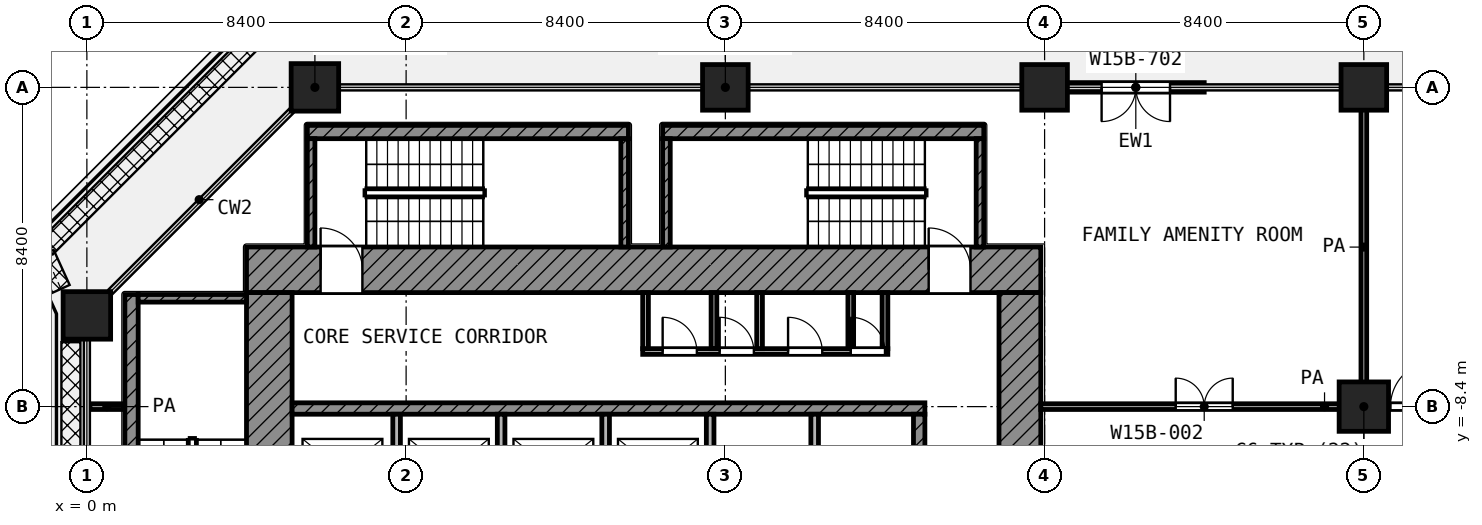
"""IFC4 building model, lengths in metres.
Left out: names, types, materials, properties, quantities, classifications, styles, units other than length and angle.
Written with IfcOpenShell. Run it as: python <this file> out.ifc"""

import sys

from ifc_helpers import new_model, si_unit, direction, frame, frame_2d, origin, origin_2d, place, context, subcontext, project, spatial, rectangle, extrude, element, fill, save


model = new_model("IFC4")
c1 = context("Model", 3, precision=1e-05, world=origin(), true_north=direction((0.0, 1.0)))
c2 = subcontext(c1, "Body", "Model", "MODEL_VIEW")
j1 = project(units=[si_unit("LENGTHUNIT", "METRE"), si_unit("PLANEANGLEUNIT", "RADIAN")], contexts=[c1])
p1 = place(None, origin())
s1 = spatial("IfcSite", under=j1, at=p1, CompositionType="ELEMENT")
p2 = place(p1, origin())
s2 = spatial("IfcBuilding", under=s1, at=p2, CompositionType="ELEMENT")
p3 = place(p2, frame((0.0, 0.0, 85.4)))
s3 = spatial("IfcBuildingStorey", under=s2, at=p3, CompositionType="ELEMENT", Elevation=85.4)
p4 = place(p3, frame((6.0, 0.0, 0.0), z_axis=(0.0, 0.0, 1.0), x_axis=(1.0, 0.0, 0.0)))
e1 = element("IfcColumn", 1, at=p4, inside=s3, PredefinedType="COLUMN", context=c2, shape_type="SweptSolid", body=[
    extrude(rectangle(XDim=1.25, YDim=1.25, at=origin_2d()), origin(), (0.0, 0.0, 1.0), 4.2),
])
for number, where, z_axis, x_axis in (
    (2, (16.8, 0.0, 0.0), (0.0, 0.0, 1.0), (1.0, 0.0, 0.0)),
    (3, (25.2, 0.0, 0.0), (0.0, 0.0, 1.0), (1.0, 0.0, 0.0)),
    (4, (33.6, 0.0, 0.0), (0.0, 0.0, 1.0), (1.0, 0.0, 0.0)),
):
    element("IfcColumn", number, at=place(p3, frame(where, z_axis=z_axis, x_axis=x_axis)), inside=s3, PredefinedType="COLUMN", context=c2, shape_type="SweptSolid", body=[
        extrude(rectangle(XDim=1.2, YDim=1.2, at=origin_2d()), origin(), (0.0, 0.0, 1.0), 4.2),
    ])
p5 = place(p3, frame((0.0, -6.0, 0.0), z_axis=(0.0, 0.0, 1.0), x_axis=(1.0, 0.0, 0.0)))
e5 = element("IfcColumn", 5, at=p5, inside=s3, PredefinedType="COLUMN", context=c2, shape_type="SweptSolid", body=[
    extrude(rectangle(XDim=1.25, YDim=1.25, at=origin_2d()), origin(), (0.0, 0.0, 1.0), 4.2),
])
p6 = place(p3, frame((33.6, -8.4, 0.0), z_axis=(0.0, 0.0, 1.0), x_axis=(1.0, 0.0, 0.0)))
e6 = element("IfcColumn", 6, at=p6, inside=s3, PredefinedType="COLUMN", context=c2, shape_type="SweptSolid", body=[
    extrude(rectangle(XDim=1.3, YDim=1.3, at=origin_2d()), origin(), (0.0, 0.0, 1.0), 4.2),
])
p7 = place(p3, frame((29.4, 0.0, 0.0), z_axis=(0.0, 0.0, 1.0), x_axis=(-1.0, 0.0, 0.0)))
e7 = element("IfcWall", 7, at=p7, inside=s3, PredefinedType="SOLIDWALL", context=c2, shape_type="SweptSolid", body=[
    extrude(rectangle(XDim=3.6, YDim=0.25, at=frame_2d((1.8, 0.0))), origin(), (0.0, 0.0, 1.0), 3.78),
])
p8 = place(p7, frame((0.9, 0.0, 0.0)))
e8 = element("IfcOpeningElement", 8, at=p8, cuts=e7, PredefinedType="OPENING", context=c2, shape_type="SweptSolid", body=[
    extrude(rectangle(XDim=1.8, YDim=2.1, at=frame_2d((0.9, 1.05))), frame((0.0, 0.135, 0.0), z_axis=(0.0, -1.0, 0.0), x_axis=(1.0, 0.0, 0.0)), (0.0, 0.0, 1.0), 0.27),
])
p9 = place(p3, frame((4.2, -4.8, 0.0), z_axis=(0.0, 0.0, 1.0), x_axis=(1.0, 0.0, 0.0)))
e9 = element("IfcWall", 9, at=p9, inside=s3, PredefinedType="SHEAR", context=c2, shape_type="SweptSolid", body=[
    extrude(rectangle(XDim=20.9, YDim=1.2, at=frame_2d((10.45, 0.0))), origin(), (0.0, 0.0, 1.0), 3.9),
])
p10 = place(p9, frame((1.95, 0.0, 0.0)))
e10 = element("IfcOpeningElement", 10, at=p10, cuts=e9, PredefinedType="OPENING", context=c2, shape_type="SweptSolid", body=[
    extrude(rectangle(XDim=1.1, YDim=2.1, at=frame_2d((0.55, 1.05))), frame((0.0, 0.61, 0.0), z_axis=(0.0, -1.0, 0.0), x_axis=(1.0, 0.0, 0.0)), (0.0, 0.0, 1.0), 1.22),
])
p11 = place(p9, frame((17.95, 0.0, 0.0)))
e11 = element("IfcOpeningElement", 11, at=p11, cuts=e9, PredefinedType="OPENING", context=c2, shape_type="SweptSolid", body=[
    extrude(rectangle(XDim=1.1, YDim=2.1, at=frame_2d((0.55, 1.05))), frame((0.0, 0.61, 0.0), z_axis=(0.0, -1.0, 0.0), x_axis=(1.0, 0.0, 0.0)), (0.0, 0.0, 1.0), 1.22),
])
p12 = place(p3, frame((4.8, -25.1, 0.0), z_axis=(0.0, 0.0, 1.0), x_axis=(0.0, 1.0, 0.0)))
e12 = element("IfcWall", 12, at=p12, inside=s3, PredefinedType="SHEAR", context=c2, shape_type="SweptSolid", body=[
    extrude(rectangle(XDim=19.7, YDim=1.2, at=frame_2d((9.85, 0.0))), origin(), (0.0, 0.0, 1.0), 3.9),
])
p13 = place(p12, frame((11.55, 0.0, 0.0)))
e13 = element("IfcOpeningElement", 13, at=p13, cuts=e12, PredefinedType="OPENING", context=c2, shape_type="SweptSolid", body=[
    extrude(rectangle(XDim=1.1, YDim=2.1, at=frame_2d((0.55, 1.05))), frame((0.0, 0.61, 0.0), z_axis=(0.0, -1.0, 0.0), x_axis=(1.0, 0.0, 0.0)), (0.0, 0.0, 1.0), 1.22),
])
p14 = place(p12, frame((2.25, 0.0, 0.0)))
e14 = element("IfcOpeningElement", 14, at=p14, cuts=e12, PredefinedType="OPENING", context=c2, shape_type="SweptSolid", body=[
    extrude(rectangle(XDim=1.1, YDim=2.1, at=frame_2d((0.55, 1.05))), frame((0.0, 0.61, 0.0), z_axis=(0.0, -1.0, 0.0), x_axis=(1.0, 0.0, 0.0)), (0.0, 0.0, 1.0), 1.22),
])
p15 = place(p3, frame((24.55, -24.0, 0.0), z_axis=(0.0, 0.0, 1.0), x_axis=(0.0, 1.0, 0.0)))
e15 = element("IfcWall", 15, at=p15, inside=s3, PredefinedType="SHEAR", context=c2, shape_type="SweptSolid", body=[
    extrude(rectangle(XDim=18.6, YDim=1.1, at=frame_2d((9.3, 0.0))), origin(), (0.0, 0.0, 1.0), 3.9),
])
p16 = place(p15, frame((10.5, 0.0, 0.0)))
e16 = element("IfcOpeningElement", 16, at=p16, cuts=e15, PredefinedType="OPENING", context=c2, shape_type="SweptSolid", body=[
    extrude(rectangle(XDim=1.8, YDim=2.1, at=frame_2d((0.9, 1.05))), frame((0.0, 0.56, 0.0), z_axis=(0.0, -1.0, 0.0), x_axis=(1.0, 0.0, 0.0)), (0.0, 0.0, 1.0), 1.12),
])
p17 = place(p3, frame((5.4, -8.45, 0.0), z_axis=(0.0, 0.0, 1.0), x_axis=(1.0, 0.0, 0.0)))
e17 = element("IfcWall", 17, at=p17, inside=s3, PredefinedType="SHEAR", context=c2, shape_type="SweptSolid", body=[
    extrude(rectangle(XDim=16.65, YDim=0.3, at=frame_2d((8.325, 0.0))), origin(), (0.0, 0.0, 1.0), 3.9),
])
p18 = place(p3, frame((21.9, -10.95, 0.0), z_axis=(0.0, 0.0, 1.0), x_axis=(0.0, 1.0, 0.0)))
e18 = element("IfcWall", 18, at=p18, inside=s3, PredefinedType="SHEAR", context=c2, shape_type="SweptSolid", body=[
    extrude(rectangle(XDim=2.35, YDim=0.3, at=frame_2d((1.175, 0.0))), origin(), (0.0, 0.0, 1.0), 3.9),
])
for number, where, z_axis, x_axis in (
    (19, (8.15, -10.95, 0.0), (0.0, 0.0, 1.0), (0.0, 1.0, 0.0)),
    (20, (10.9, -10.95, 0.0), (0.0, 0.0, 1.0), (0.0, 1.0, 0.0)),
    (21, (13.65, -10.95, 0.0), (0.0, 0.0, 1.0), (0.0, 1.0, 0.0)),
    (22, (16.4, -10.95, 0.0), (0.0, 0.0, 1.0), (0.0, 1.0, 0.0)),
    (23, (19.15, -10.95, 0.0), (0.0, 0.0, 1.0), (0.0, 1.0, 0.0)),
):
    element("IfcWall", number, at=place(p3, frame(where, z_axis=z_axis, x_axis=x_axis)), inside=s3, PredefinedType="PARTITIONING", context=c2, shape_type="SweptSolid", body=[
        extrude(rectangle(XDim=2.35, YDim=0.2, at=frame_2d((1.175, 0.0))), origin(), (0.0, 0.0, 1.0), 3.9),
    ])
p19 = place(p3, frame((14.625, -6.95, 0.0), z_axis=(0.0, 0.0, 1.0), x_axis=(1.0, 0.0, 0.0)))
e24 = element("IfcWall", 24, at=p19, inside=s3, PredefinedType="PARTITIONING", context=c2, shape_type="SweptSolid", body=[
    extrude(rectangle(XDim=6.45, YDim=0.15, at=frame_2d((3.225, 0.0))), origin(), (0.0, 0.0, 1.0), 3.9),
])
p20 = place(p19, frame((0.525, 0.0, 0.0)))
e25 = element("IfcOpeningElement", 25, at=p20, cuts=e24, PredefinedType="OPENING", context=c2, shape_type="SweptSolid", body=[
    extrude(rectangle(XDim=0.9, YDim=2.1, at=frame_2d((0.45, 1.05))), frame((0.0, 0.085, 0.0), z_axis=(0.0, -1.0, 0.0), x_axis=(1.0, 0.0, 0.0)), (0.0, 0.0, 1.0), 0.17),
])
p21 = place(p19, frame((2.025, 0.0, 0.0)))
e26 = element("IfcOpeningElement", 26, at=p21, cuts=e24, PredefinedType="OPENING", context=c2, shape_type="SweptSolid", body=[
    extrude(rectangle(XDim=0.9, YDim=2.1, at=frame_2d((0.45, 1.05))), frame((0.0, 0.085, 0.0), z_axis=(0.0, -1.0, 0.0), x_axis=(1.0, 0.0, 0.0)), (0.0, 0.0, 1.0), 0.17),
])
p22 = place(p19, frame((3.825, 0.0, 0.0)))
e27 = element("IfcOpeningElement", 27, at=p22, cuts=e24, PredefinedType="OPENING", context=c2, shape_type="SweptSolid", body=[
    extrude(rectangle(XDim=0.9, YDim=2.1, at=frame_2d((0.45, 1.05))), frame((0.0, 0.085, 0.0), z_axis=(0.0, -1.0, 0.0), x_axis=(1.0, 0.0, 0.0)), (0.0, 0.0, 1.0), 0.17),
])
p23 = place(p19, frame((5.475, 0.0, 0.0)))
e28 = element("IfcOpeningElement", 28, at=p23, cuts=e24, PredefinedType="OPENING", context=c2, shape_type="SweptSolid", body=[
    extrude(rectangle(XDim=0.9, YDim=2.1, at=frame_2d((0.45, 1.05))), frame((0.0, 0.085, 0.0), z_axis=(0.0, -1.0, 0.0), x_axis=(1.0, 0.0, 0.0)), (0.0, 0.0, 1.0), 0.17),
])
for number, where, z_axis, x_axis in (
    (29, (14.7, -6.875, 0.0), (0.0, 0.0, 1.0), (0.0, 1.0, 0.0)),
    (30, (16.5, -6.875, 0.0), (0.0, 0.0, 1.0), (0.0, 1.0, 0.0)),
    (31, (17.7, -6.875, 0.0), (0.0, 0.0, 1.0), (0.0, 1.0, 0.0)),
    (32, (20.1, -6.875, 0.0), (0.0, 0.0, 1.0), (0.0, 1.0, 0.0)),
    (33, (21.0, -6.875, 0.0), (0.0, 0.0, 1.0), (0.0, 1.0, 0.0)),
):
    element("IfcWall", number, at=place(p3, frame(where, z_axis=z_axis, x_axis=x_axis)), inside=s3, PredefinedType="PARTITIONING", context=c2, shape_type="SweptSolid", body=[
        extrude(rectangle(XDim=1.475, YDim=0.15, at=frame_2d((0.738, 0.0))), origin(), (0.0, 0.0, 1.0), 3.9),
    ])
p24 = place(p3, frame((1.175, -13.9, 0.0), z_axis=(0.0, 0.0, 1.0), x_axis=(0.0, 1.0, 0.0)))
e34 = element("IfcWall", 34, at=p24, inside=s3, PredefinedType="SHEAR", context=c2, shape_type="SweptSolid", body=[
    extrude(rectangle(XDim=8.45, YDim=0.35, at=frame_2d((4.225, 0.0))), origin(), (0.0, 0.0, 1.0), 3.9),
])
p25 = place(p3, frame((1.35, -5.55, 0.0), z_axis=(0.0, 0.0, 1.0), x_axis=(1.0, 0.0, 0.0)))
e35 = element("IfcWall", 35, at=p25, inside=s3, PredefinedType="SHEAR", context=c2, shape_type="SweptSolid", body=[
    extrude(rectangle(XDim=2.85, YDim=0.2, at=frame_2d((1.425, 0.0))), origin(), (0.0, 0.0, 1.0), 3.9),
])
p26 = place(p3, frame((5.8, -1.175, 0.0), z_axis=(0.0, 0.0, 1.0), x_axis=(1.0, 0.0, 0.0)))
e36 = element("IfcWall", 36, at=p26, inside=s3, PredefinedType="SHEAR", context=c2, shape_type="SweptSolid", body=[
    extrude(rectangle(XDim=8.45, YDim=0.35, at=frame_2d((4.225, 0.0))), origin(), (0.0, 0.0, 1.0), 3.9),
])
for number, where, z_axis, x_axis in (
    (37, (5.9, -4.2, 0.0), (0.0, 0.0, 1.0), (0.0, 1.0, 0.0)),
    (38, (14.15, -4.2, 0.0), (0.0, 0.0, 1.0), (0.0, 1.0, 0.0)),
):
    element("IfcWall", number, at=place(p3, frame(where, z_axis=z_axis, x_axis=x_axis)), inside=s3, PredefinedType="SHEAR", context=c2, shape_type="SweptSolid", body=[
        extrude(rectangle(XDim=2.85, YDim=0.2, at=frame_2d((1.425, 0.0))), origin(), (0.0, 0.0, 1.0), 3.9),
    ])
p27 = place(p3, frame((15.15, -1.175, 0.0), z_axis=(0.0, 0.0, 1.0), x_axis=(1.0, 0.0, 0.0)))
e39 = element("IfcWall", 39, at=p27, inside=s3, PredefinedType="SHEAR", context=c2, shape_type="SweptSolid", body=[
    extrude(rectangle(XDim=8.45, YDim=0.35, at=frame_2d((4.225, 0.0))), origin(), (0.0, 0.0, 1.0), 3.9),
])
for number, where, z_axis, x_axis in (
    (40, (15.25, -4.2, 0.0), (0.0, 0.0, 1.0), (0.0, 1.0, 0.0)),
    (41, (23.5, -4.2, 0.0), (0.0, 0.0, 1.0), (0.0, 1.0, 0.0)),
):
    element("IfcWall", number, at=place(p3, frame(where, z_axis=z_axis, x_axis=x_axis)), inside=s3, PredefinedType="SHEAR", context=c2, shape_type="SweptSolid", body=[
        extrude(rectangle(XDim=2.85, YDim=0.2, at=frame_2d((1.425, 0.0))), origin(), (0.0, 0.0, 1.0), 3.9),
    ])
p28 = place(p3, frame((0.08, -8.4, 0.0), z_axis=(0.0, 0.0, 1.0), x_axis=(1.0, 0.0, 0.0)))
e42 = element("IfcWall", 42, at=p28, inside=s3, PredefinedType="PARTITIONING", context=c2, shape_type="SweptSolid", body=[
    extrude(rectangle(XDim=0.89, YDim=0.15, at=frame_2d((0.445, 0.0))), origin(), (0.0, 0.0, 1.0), 3.9),
])
p29 = place(p3, frame((25.1, -8.4, 0.0), z_axis=(0.0, 0.0, 1.0), x_axis=(1.0, 0.0, 0.0)))
e43 = element("IfcWall", 43, at=p29, inside=s3, PredefinedType="PARTITIONING", context=c2, shape_type="SweptSolid", body=[
    extrude(rectangle(XDim=14.932, YDim=0.15, at=frame_2d((7.466, 0.0))), origin(), (0.0, 0.0, 1.0), 3.9),
])
p30 = place(p29, frame((3.55, 0.0, 0.0)))
e44 = element("IfcOpeningElement", 44, at=p30, cuts=e43, PredefinedType="OPENING", context=c2, shape_type="SweptSolid", body=[
    extrude(rectangle(XDim=1.5, YDim=2.1, at=frame_2d((0.75, 1.05))), frame((0.0, 0.085, 0.0), z_axis=(0.0, -1.0, 0.0), x_axis=(1.0, 0.0, 0.0)), (0.0, 0.0, 1.0), 0.17),
])
p31 = place(p29, frame((9.2, 0.0, 0.0)))
e45 = element("IfcOpeningElement", 45, at=p31, cuts=e43, PredefinedType="OPENING", context=c2, shape_type="SweptSolid", body=[
    extrude(rectangle(XDim=1.2, YDim=2.1, at=frame_2d((0.6, 1.05))), frame((0.0, 0.085, 0.0), z_axis=(0.0, -1.0, 0.0), x_axis=(1.0, 0.0, 0.0)), (0.0, 0.0, 1.0), 0.17),
])
p32 = place(p3, frame((33.6, -8.325, 0.0), z_axis=(0.0, 0.0, 1.0), x_axis=(0.0, 1.0, 0.0)))
e46 = element("IfcWall", 46, at=p32, inside=s3, PredefinedType="PARTITIONING", context=c2, shape_type="SweptSolid", body=[
    extrude(rectangle(XDim=8.245, YDim=0.15, at=frame_2d((4.123, 0.0))), origin(), (0.0, 0.0, 1.0), 3.9),
])
p33 = place(p8, origin())
e47 = element("IfcDoor", 47, at=p33, inside=s3, OperationType="DOUBLE_DOOR_SINGLE_SWING", PredefinedType="DOOR", context=c2, shape_type="SweptSolid", body=[
    extrude(rectangle(XDim=1.8, YDim=2.1, at=frame_2d((0.9, 1.05))), frame((0.0, 0.025, 0.0), z_axis=(0.0, -1.0, 0.0), x_axis=(1.0, 0.0, 0.0)), (0.0, 0.0, 1.0), 0.05),
])
fill(e8, e47)
p34 = place(p10, origin())
e48 = element("IfcDoor", 48, at=p34, inside=s3, OperationType="SINGLE_SWING_LEFT", PredefinedType="DOOR", context=c2, shape_type="SweptSolid", body=[
    extrude(rectangle(XDim=1.1, YDim=2.1, at=frame_2d((0.55, 1.05))), frame((0.0, 0.025, 0.0), z_axis=(0.0, -1.0, 0.0), x_axis=(1.0, 0.0, 0.0)), (0.0, 0.0, 1.0), 0.05),
])
fill(e10, e48)
p35 = place(p11, origin())
e49 = element("IfcDoor", 49, at=p35, inside=s3, OperationType="SINGLE_SWING_LEFT", PredefinedType="DOOR", context=c2, shape_type="SweptSolid", body=[
    extrude(rectangle(XDim=1.1, YDim=2.1, at=frame_2d((0.55, 1.05))), frame((0.0, 0.025, 0.0), z_axis=(0.0, -1.0, 0.0), x_axis=(1.0, 0.0, 0.0)), (0.0, 0.0, 1.0), 0.05),
])
fill(e11, e49)
p36 = place(p20, origin())
e50 = element("IfcDoor", 50, at=p36, inside=s3, OperationType="SINGLE_SWING_LEFT", PredefinedType="DOOR", context=c2, shape_type="SweptSolid", body=[
    extrude(rectangle(XDim=0.9, YDim=2.1, at=frame_2d((0.45, 1.05))), frame((0.0, 0.025, 0.0), z_axis=(0.0, -1.0, 0.0), x_axis=(1.0, 0.0, 0.0)), (0.0, 0.0, 1.0), 0.05),
])
fill(e25, e50)
p37 = place(p21, origin())
e51 = element("IfcDoor", 51, at=p37, inside=s3, OperationType="SINGLE_SWING_LEFT", PredefinedType="DOOR", context=c2, shape_type="SweptSolid", body=[
    extrude(rectangle(XDim=0.9, YDim=2.1, at=frame_2d((0.45, 1.05))), frame((0.0, 0.025, 0.0), z_axis=(0.0, -1.0, 0.0), x_axis=(1.0, 0.0, 0.0)), (0.0, 0.0, 1.0), 0.05),
])
fill(e26, e51)
p38 = place(p22, origin())
e52 = element("IfcDoor", 52, at=p38, inside=s3, OperationType="SINGLE_SWING_LEFT", PredefinedType="DOOR", context=c2, shape_type="SweptSolid", body=[
    extrude(rectangle(XDim=0.9, YDim=2.1, at=frame_2d((0.45, 1.05))), frame((0.0, 0.025, 0.0), z_axis=(0.0, -1.0, 0.0), x_axis=(1.0, 0.0, 0.0)), (0.0, 0.0, 1.0), 0.05),
])
fill(e27, e52)
p39 = place(p23, origin())
e53 = element("IfcDoor", 53, at=p39, inside=s3, OperationType="SINGLE_SWING_LEFT", PredefinedType="DOOR", context=c2, shape_type="SweptSolid", body=[
    extrude(rectangle(XDim=0.9, YDim=2.1, at=frame_2d((0.45, 1.05))), frame((0.0, 0.025, 0.0), z_axis=(0.0, -1.0, 0.0), x_axis=(1.0, 0.0, 0.0)), (0.0, 0.0, 1.0), 0.05),
])
fill(e28, e53)
p40 = place(p30, origin())
e54 = element("IfcDoor", 54, at=p40, inside=s3, OperationType="DOUBLE_DOOR_SINGLE_SWING", PredefinedType="DOOR", context=c2, shape_type="SweptSolid", body=[
    extrude(rectangle(XDim=1.5, YDim=2.1, at=frame_2d((0.75, 1.05))), frame((0.0, 0.025, 0.0), z_axis=(0.0, -1.0, 0.0), x_axis=(1.0, 0.0, 0.0)), (0.0, 0.0, 1.0), 0.05),
])
fill(e44, e54)
p41 = place(p31, origin())
e55 = element("IfcDoor", 55, at=p41, inside=s3, OperationType="SINGLE_SWING_RIGHT", PredefinedType="DOOR", context=c2, shape_type="SweptSolid", body=[
    extrude(rectangle(XDim=1.2, YDim=2.1, at=frame_2d((0.6, 1.05))), frame((0.0, 0.025, 0.0), z_axis=(0.0, -1.0, 0.0), x_axis=(1.0, 0.0, 0.0)), (0.0, 0.0, 1.0), 0.05),
])
fill(e45, e55)
save(model, sys.argv[1])
